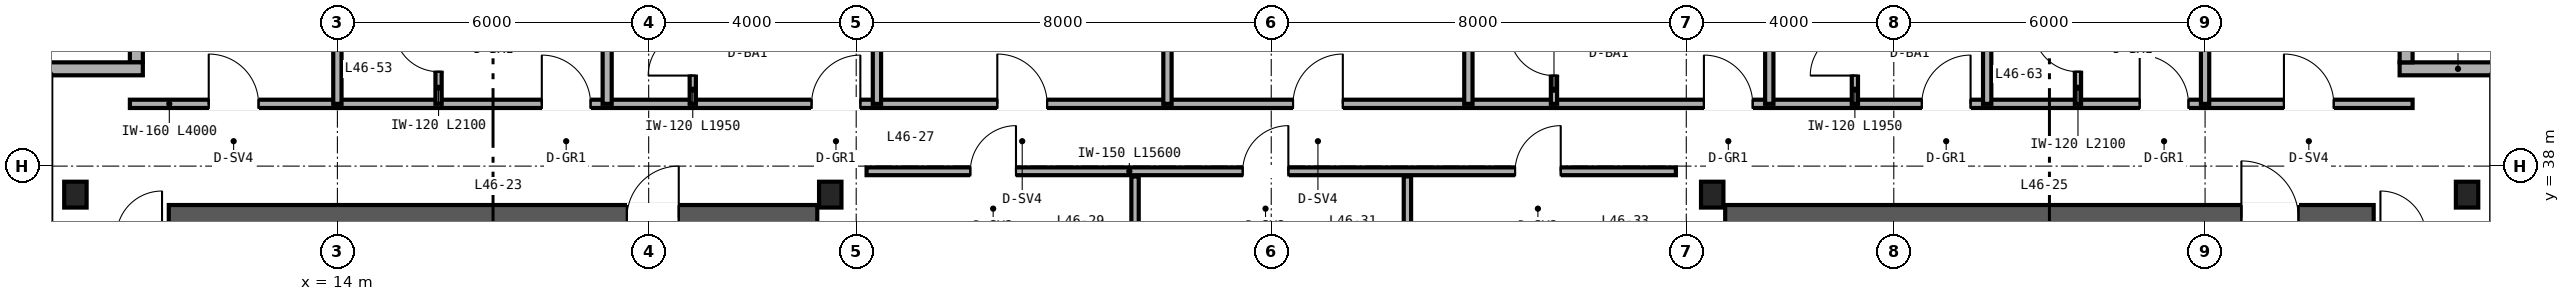
"""IFC4 building model, lengths in metres.
Left out: names, types, materials, properties, quantities, classifications, styles, units other than length and angle.
Written with IfcOpenShell. Run it as: python <this file> out.ifc"""

import sys

from ifc_helpers import new_model, si_unit, direction, frame, frame_2d, origin, origin_2d, place, context, subcontext, project, spatial, rectangle, i_section, extrude, source, transform, mapped, element, fill, save


model = new_model("IFC4")
c1 = context("Model", 3, precision=1e-05, world=origin(), true_north=direction((0.0, 1.0)))
c2 = subcontext(c1, "Body", "Model", "MODEL_VIEW")
j1 = project(units=[si_unit("LENGTHUNIT", "METRE"), si_unit("PLANEANGLEUNIT", "RADIAN")], contexts=[c1])
p1 = place(None, origin())
s1 = spatial("IfcSite", under=j1, at=p1, CompositionType="ELEMENT")
p2 = place(p1, origin())
s2 = spatial("IfcBuilding", under=s1, at=p2, CompositionType="ELEMENT")
p3 = place(p2, frame((0.0, 0.0, 184.8)))
s3 = spatial("IfcBuildingStorey", under=s2, at=p3, CompositionType="ELEMENT", Elevation=184.8)
p4 = place(p3, frame((10.75, 37.0, 0.0), z_axis=(0.0, 0.0, 1.0), x_axis=(1.0, 0.0, 0.0)))
e1 = element("IfcWall", 1, at=p4, inside=s3, PredefinedType="SHEAR", context=c2, shape_type="SweptSolid", body=[
    extrude(rectangle(XDim=12.5, YDim=0.5, at=frame_2d((6.25, 0.0))), origin(), (0.0, 0.0, 1.0), 3.37),
])
p5 = place(p4, frame((8.83, 0.0, 0.0)))
e2 = element("IfcOpeningElement", 2, at=p5, cuts=e1, PredefinedType="OPENING", context=c2, shape_type="SweptSolid", body=[
    extrude(rectangle(XDim=1.0, YDim=2.15, at=frame_2d((0.5, 1.075))), frame((0.0, 0.26, 0.0), z_axis=(0.0, -1.0, 0.0), x_axis=(1.0, 0.0, 0.0)), (0.0, 0.0, 1.0), 0.52),
])
p6 = place(p3, frame((40.75, 37.0, 0.0), z_axis=(0.0, 0.0, 1.0), x_axis=(1.0, 0.0, 0.0)))
e3 = element("IfcWall", 3, at=p6, inside=s3, PredefinedType="SHEAR", context=c2, shape_type="SweptSolid", body=[
    extrude(rectangle(XDim=12.5, YDim=0.5, at=frame_2d((6.25, 0.0))), origin(), (0.0, 0.0, 1.0), 3.37),
])
p7 = place(p6, frame((9.95, 0.0, 0.0)))
e4 = element("IfcOpeningElement", 4, at=p7, cuts=e3, PredefinedType="OPENING", context=c2, shape_type="SweptSolid", body=[
    extrude(rectangle(XDim=1.1, YDim=2.15, at=frame_2d((0.55, 1.075))), frame((0.0, 0.26, 0.0), z_axis=(0.0, -1.0, 0.0), x_axis=(1.0, 0.0, 0.0)), (0.0, 0.0, 1.0), 0.52),
])
m1 = source(origin(), c2, "Body", "SweptSolid", [
    extrude(i_section(OverallWidth=0.432, OverallDepth=0.498, WebThickness=0.056, FlangeThickness=0.089, FilletRadius=0.025, at=origin_2d()), origin(), (0.0, 0.0, 1.0), 3.37),
])
for number, where, z_axis, x_axis in (
    (5, (8.95, 37.45, 0.0), (0.0, 0.0, 1.0), (1.0, 0.0, 0.0)),
    (6, (23.5, 37.45, 0.0), (0.0, 0.0, 1.0), (1.0, 0.0, 0.0)),
    (7, (40.5, 37.45, 0.0), (0.0, 0.0, 1.0), (1.0, 0.0, 0.0)),
    (8, (55.05, 37.45, 0.0), (0.0, 0.0, 1.0), (1.0, 0.0, 0.0)),
):
    element("IfcColumn", number, at=place(p3, frame(where, z_axis=z_axis, x_axis=x_axis)), inside=s3, PredefinedType="COLUMN", context=c2, shape_type="MappedRepresentation", body=[
        mapped(m1, transform((0.0, 0.0, 0.0), scale=1.0)),
    ])
p8 = place(p3, frame((56.0, 39.875, 0.0), z_axis=(0.0, 0.0, 1.0), x_axis=(-1.0, 0.0, 0.0)))
e9 = element("IfcWall", 9, at=p8, inside=s3, PredefinedType="SOLIDWALL", context=c2, shape_type="SweptSolid", body=[
    extrude(rectangle(XDim=2.25, YDim=0.25, at=frame_2d((1.125, 0.0))), origin(), (0.0, 0.0, 1.0), 3.37),
])
for number, where, z_axis, x_axis in (
    (10, (53.875, 40.0, 0.0), (0.0, 0.0, 1.0), (0.0, 1.0, 0.0)),
    (11, (10.125, 42.0, 0.0), (0.0, 0.0, 1.0), (0.0, -1.0, 0.0)),
):
    element("IfcWall", number, at=place(p3, frame(where, z_axis=z_axis, x_axis=x_axis)), inside=s3, PredefinedType="SOLIDWALL", context=c2, shape_type="SweptSolid", body=[
        extrude(rectangle(XDim=2.0, YDim=0.25, at=frame_2d((1.0, 0.0))), origin(), (0.0, 0.0, 1.0), 3.37),
    ])
p9 = place(p3, frame((10.25, 39.875, 0.0), z_axis=(0.0, 0.0, 1.0), x_axis=(-1.0, 0.0, 0.0)))
e12 = element("IfcWall", 12, at=p9, inside=s3, PredefinedType="SOLIDWALL", context=c2, shape_type="SweptSolid", body=[
    extrude(rectangle(XDim=2.25, YDim=0.25, at=frame_2d((1.125, 0.0))), origin(), (0.0, 0.0, 1.0), 3.37),
])
p10 = place(p3, frame((24.2, 37.9, 0.0), z_axis=(0.0, 0.0, 1.0), x_axis=(1.0, 0.0, 0.0)))
e13 = element("IfcWall", 13, at=p10, inside=s3, PredefinedType="PARTITIONING", context=c2, shape_type="SweptSolid", body=[
    extrude(rectangle(XDim=15.6, YDim=0.15, at=frame_2d((7.8, 0.0))), origin(), (0.0, 0.0, 1.0), 3.37),
])
p11 = place(p10, frame((2.0, 0.0, 0.0)))
e14 = element("IfcOpeningElement", 14, at=p11, cuts=e13, PredefinedType="OPENING", context=c2, shape_type="SweptSolid", body=[
    extrude(rectangle(XDim=0.88, YDim=2.15, at=frame_2d((0.44, 1.075))), frame((0.0, 0.085, 0.0), z_axis=(0.0, -1.0, 0.0), x_axis=(1.0, 0.0, 0.0)), (0.0, 0.0, 1.0), 0.17),
])
p12 = place(p10, frame((7.25, 0.0, 0.0)))
e15 = element("IfcOpeningElement", 15, at=p12, cuts=e13, PredefinedType="OPENING", context=c2, shape_type="SweptSolid", body=[
    extrude(rectangle(XDim=0.88, YDim=2.15, at=frame_2d((0.44, 1.075))), frame((0.0, 0.085, 0.0), z_axis=(0.0, -1.0, 0.0), x_axis=(1.0, 0.0, 0.0)), (0.0, 0.0, 1.0), 0.17),
])
p13 = place(p10, frame((12.5, 0.0, 0.0)))
e16 = element("IfcOpeningElement", 16, at=p13, cuts=e13, PredefinedType="OPENING", context=c2, shape_type="SweptSolid", body=[
    extrude(rectangle(XDim=0.88, YDim=2.15, at=frame_2d((0.44, 1.075))), frame((0.0, 0.085, 0.0), z_axis=(0.0, -1.0, 0.0), x_axis=(1.0, 0.0, 0.0)), (0.0, 0.0, 1.0), 0.17),
])
for number, where, z_axis, x_axis in (
    (17, (29.375, 36.12, 0.0), (0.0, 0.0, 1.0), (0.0, 1.0, 0.0)),
    (18, (34.625, 36.12, 0.0), (0.0, 0.0, 1.0), (0.0, 1.0, 0.0)),
):
    element("IfcWall", number, at=place(p3, frame(where, z_axis=z_axis, x_axis=x_axis)), inside=s3, PredefinedType="PARTITIONING", context=c2, shape_type="SweptSolid", body=[
        extrude(rectangle(XDim=1.68, YDim=0.142, at=frame_2d((0.84, 0.0))), origin(), (0.0, 0.0, 1.0), 3.37),
    ])
p14 = place(p3, frame((10.0, 39.2, 0.0), z_axis=(0.0, 0.0, 1.0), x_axis=(1.0, 0.0, 0.0)))
e19 = element("IfcWall", 19, at=p14, inside=s3, PredefinedType="PARTITIONING", context=c2, shape_type="SweptSolid", body=[
    extrude(rectangle(XDim=4.0, YDim=0.16, at=frame_2d((2.0, 0.0))), origin(), (0.0, 0.0, 1.0), 3.37),
])
p15 = place(p14, frame((1.52, 0.0, 0.0)))
e20 = element("IfcOpeningElement", 20, at=p15, cuts=e19, PredefinedType="OPENING", context=c2, shape_type="SweptSolid", body=[
    extrude(rectangle(XDim=0.96, YDim=2.15, at=frame_2d((0.48, 1.075))), frame((0.0, 0.09, 0.0), z_axis=(0.0, -1.0, 0.0), x_axis=(1.0, 0.0, 0.0)), (0.0, 0.0, 1.0), 0.18),
])
p16 = place(p3, frame((50.0, 39.2, 0.0), z_axis=(0.0, 0.0, 1.0), x_axis=(1.0, 0.0, 0.0)))
e21 = element("IfcWall", 21, at=p16, inside=s3, PredefinedType="PARTITIONING", context=c2, shape_type="SweptSolid", body=[
    extrude(rectangle(XDim=4.0, YDim=0.16, at=frame_2d((2.0, 0.0))), origin(), (0.0, 0.0, 1.0), 3.37),
])
p17 = place(p16, frame((1.52, 0.0, 0.0)))
e22 = element("IfcOpeningElement", 22, at=p17, cuts=e21, PredefinedType="OPENING", context=c2, shape_type="SweptSolid", body=[
    extrude(rectangle(XDim=0.96, YDim=2.15, at=frame_2d((0.48, 1.075))), frame((0.0, 0.09, 0.0), z_axis=(0.0, -1.0, 0.0), x_axis=(1.0, 0.0, 0.0)), (0.0, 0.0, 1.0), 0.18),
])
p18 = place(p3, frame((14.0, 39.2, 0.0), z_axis=(0.0, 0.0, 1.0), x_axis=(1.0, 0.0, 0.0)))
e23 = element("IfcWall", 23, at=p18, inside=s3, PredefinedType="PARTITIONING", context=c2, shape_type="SweptSolid", body=[
    extrude(rectangle(XDim=36.0, YDim=0.16, at=frame_2d((18.0, 0.0))), origin(), (0.0, 0.0, 1.0), 2.913),
])
p19 = place(p18, frame((3.94, 0.0, 0.0)))
e24 = element("IfcOpeningElement", 24, at=p19, cuts=e23, PredefinedType="OPENING", context=c2, shape_type="SweptSolid", body=[
    extrude(rectangle(XDim=0.94, YDim=2.15, at=frame_2d((0.47, 1.075))), frame((0.0, 0.09, 0.0), z_axis=(0.0, -1.0, 0.0), x_axis=(1.0, 0.0, 0.0)), (0.0, 0.0, 1.0), 0.18),
])
p20 = place(p18, frame((9.14, 0.0, 0.0)))
e25 = element("IfcOpeningElement", 25, at=p20, cuts=e23, PredefinedType="OPENING", context=c2, shape_type="SweptSolid", body=[
    extrude(rectangle(XDim=0.94, YDim=2.15, at=frame_2d((0.47, 1.075))), frame((0.0, 0.09, 0.0), z_axis=(0.0, -1.0, 0.0), x_axis=(1.0, 0.0, 0.0)), (0.0, 0.0, 1.0), 0.18),
])
p21 = place(p18, frame((12.72, 0.0, 0.0)))
e26 = element("IfcOpeningElement", 26, at=p21, cuts=e23, PredefinedType="OPENING", context=c2, shape_type="SweptSolid", body=[
    extrude(rectangle(XDim=0.96, YDim=2.15, at=frame_2d((0.48, 1.075))), frame((0.0, 0.09, 0.0), z_axis=(0.0, -1.0, 0.0), x_axis=(1.0, 0.0, 0.0)), (0.0, 0.0, 1.0), 0.18),
])
p22 = place(p18, frame((18.42, 0.0, 0.0)))
e27 = element("IfcOpeningElement", 27, at=p22, cuts=e23, PredefinedType="OPENING", context=c2, shape_type="SweptSolid", body=[
    extrude(rectangle(XDim=0.96, YDim=2.15, at=frame_2d((0.48, 1.075))), frame((0.0, 0.09, 0.0), z_axis=(0.0, -1.0, 0.0), x_axis=(1.0, 0.0, 0.0)), (0.0, 0.0, 1.0), 0.18),
])
p23 = place(p18, frame((26.34, 0.0, 0.0)))
e28 = element("IfcOpeningElement", 28, at=p23, cuts=e23, PredefinedType="OPENING", context=c2, shape_type="SweptSolid", body=[
    extrude(rectangle(XDim=0.94, YDim=2.15, at=frame_2d((0.47, 1.075))), frame((0.0, 0.09, 0.0), z_axis=(0.0, -1.0, 0.0), x_axis=(1.0, 0.0, 0.0)), (0.0, 0.0, 1.0), 0.18),
])
p24 = place(p18, frame((30.54, 0.0, 0.0)))
e29 = element("IfcOpeningElement", 29, at=p24, cuts=e23, PredefinedType="OPENING", context=c2, shape_type="SweptSolid", body=[
    extrude(rectangle(XDim=0.94, YDim=2.15, at=frame_2d((0.47, 1.075))), frame((0.0, 0.09, 0.0), z_axis=(0.0, -1.0, 0.0), x_axis=(1.0, 0.0, 0.0)), (0.0, 0.0, 1.0), 0.18),
])
p25 = place(p18, frame((34.74, 0.0, 0.0)))
e30 = element("IfcOpeningElement", 30, at=p25, cuts=e23, PredefinedType="OPENING", context=c2, shape_type="SweptSolid", body=[
    extrude(rectangle(XDim=0.94, YDim=2.15, at=frame_2d((0.47, 1.075))), frame((0.0, 0.09, 0.0), z_axis=(0.0, -1.0, 0.0), x_axis=(1.0, 0.0, 0.0)), (0.0, 0.0, 1.0), 0.18),
])
for number, where, z_axis, x_axis in (
    (31, (14.0, 39.2, 0.0), (0.0, 0.0, 1.0), (0.0, 1.0, 0.0)),
    (32, (50.0, 39.2, 0.0), (0.0, 0.0, 1.0), (0.0, 1.0, 0.0)),
):
    element("IfcWall", number, at=place(p3, frame(where, z_axis=z_axis, x_axis=x_axis)), inside=s3, PredefinedType="PARTITIONING", context=c2, shape_type="SweptSolid", body=[
        extrude(rectangle(XDim=6.44, YDim=0.16, at=frame_2d((3.22, 0.0))), origin(), (0.0, 0.0, 1.0), 2.677),
    ])
p26 = place(p3, frame((19.2, 39.2, 0.0), z_axis=(0.0, 0.0, 1.0), x_axis=(0.0, 1.0, 0.0)))
e33 = element("IfcWall", 33, at=p26, inside=s3, PredefinedType="PARTITIONING", context=c2, shape_type="SweptSolid", body=[
    extrude(rectangle(XDim=6.44, YDim=0.175, at=frame_2d((3.22, 0.0))), origin(), (0.0, 0.0, 1.0), 2.677),
])
p27 = place(p3, frame((15.95, 39.2, 0.0), z_axis=(0.0, 0.0, 1.0), x_axis=(0.0, 1.0, 0.0)))
e34 = element("IfcWall", 34, at=p27, inside=s3, PredefinedType="PARTITIONING", context=c2, shape_type="SweptSolid", body=[
    extrude(rectangle(XDim=2.1, YDim=0.12, at=frame_2d((1.05, 0.0))), origin(), (0.0, 0.0, 1.0), 3.37),
])
p28 = place(p27, frame((0.62, 0.0, 0.0)))
e35 = element("IfcOpeningElement", 35, at=p28, cuts=e34, PredefinedType="OPENING", context=c2, shape_type="SweptSolid", body=[
    extrude(rectangle(XDim=0.86, YDim=2.1, at=frame_2d((0.43, 1.05))), frame((0.0, 0.07, 0.0), z_axis=(0.0, -1.0, 0.0), x_axis=(1.0, 0.0, 0.0)), (0.0, 0.0, 1.0), 0.14),
])
p29 = place(p3, frame((24.4, 39.2, 0.0), z_axis=(0.0, 0.0, 1.0), x_axis=(0.0, 1.0, 0.0)))
e36 = element("IfcWall", 36, at=p29, inside=s3, PredefinedType="PARTITIONING", context=c2, shape_type="SweptSolid", body=[
    extrude(rectangle(XDim=6.44, YDim=0.16, at=frame_2d((3.22, 0.0))), origin(), (0.0, 0.0, 1.0), 2.443),
])
p30 = place(p3, frame((20.85, 39.2, 0.0), z_axis=(0.0, 0.0, 1.0), x_axis=(0.0, 1.0, 0.0)))
e37 = element("IfcWall", 37, at=p30, inside=s3, PredefinedType="PARTITIONING", context=c2, shape_type="SweptSolid", body=[
    extrude(rectangle(XDim=1.95, YDim=0.12, at=frame_2d((0.975, 0.0))), origin(), (0.0, 0.0, 1.0), 3.37),
])
p31 = place(p30, frame((0.545, 0.0, 0.0)))
e38 = element("IfcOpeningElement", 38, at=p31, cuts=e37, PredefinedType="OPENING", context=c2, shape_type="SweptSolid", body=[
    extrude(rectangle(XDim=0.86, YDim=2.1, at=frame_2d((0.43, 1.05))), frame((0.0, 0.07, 0.0), z_axis=(0.0, -1.0, 0.0), x_axis=(1.0, 0.0, 0.0)), (0.0, 0.0, 1.0), 0.14),
])
for number, where, z_axis, x_axis in (
    (39, (30.0, 39.2, 0.0), (0.0, 0.0, 1.0), (0.0, 1.0, 0.0)),
    (40, (35.8, 39.2, 0.0), (0.0, 0.0, 1.0), (0.0, 1.0, 0.0)),
):
    element("IfcWall", number, at=place(p3, frame(where, z_axis=z_axis, x_axis=x_axis)), inside=s3, PredefinedType="PARTITIONING", context=c2, shape_type="SweptSolid", body=[
        extrude(rectangle(XDim=6.44, YDim=0.16, at=frame_2d((3.22, 0.0))), origin(), (0.0, 0.0, 1.0), 2.443),
    ])
p32 = place(p3, frame((41.6, 39.2, 0.0), z_axis=(0.0, 0.0, 1.0), x_axis=(0.0, 1.0, 0.0)))
e41 = element("IfcWall", 41, at=p32, inside=s3, PredefinedType="PARTITIONING", context=c2, shape_type="SweptSolid", body=[
    extrude(rectangle(XDim=6.44, YDim=0.16, at=frame_2d((3.22, 0.0))), origin(), (0.0, 0.0, 1.0), 2.833),
])
p33 = place(p3, frame((37.45, 39.2, 0.0), z_axis=(0.0, 0.0, 1.0), x_axis=(0.0, 1.0, 0.0)))
e42 = element("IfcWall", 42, at=p33, inside=s3, PredefinedType="PARTITIONING", context=c2, shape_type="SweptSolid", body=[
    extrude(rectangle(XDim=1.95, YDim=0.12, at=frame_2d((0.975, 0.0))), origin(), (0.0, 0.0, 1.0), 3.37),
])
p34 = place(p33, frame((0.545, 0.0, 0.0)))
e43 = element("IfcOpeningElement", 43, at=p34, cuts=e42, PredefinedType="OPENING", context=c2, shape_type="SweptSolid", body=[
    extrude(rectangle(XDim=0.86, YDim=2.1, at=frame_2d((0.43, 1.05))), frame((0.0, 0.07, 0.0), z_axis=(0.0, -1.0, 0.0), x_axis=(1.0, 0.0, 0.0)), (0.0, 0.0, 1.0), 0.14),
])
p35 = place(p3, frame((45.8, 39.2, 0.0), z_axis=(0.0, 0.0, 1.0), x_axis=(0.0, 1.0, 0.0)))
e44 = element("IfcWall", 44, at=p35, inside=s3, PredefinedType="PARTITIONING", context=c2, shape_type="SweptSolid", body=[
    extrude(rectangle(XDim=6.44, YDim=0.16, at=frame_2d((3.22, 0.0))), origin(), (0.0, 0.0, 1.0), 2.677),
])
p36 = place(p3, frame((43.25, 39.2, 0.0), z_axis=(0.0, 0.0, 1.0), x_axis=(0.0, 1.0, 0.0)))
e45 = element("IfcWall", 45, at=p36, inside=s3, PredefinedType="PARTITIONING", context=c2, shape_type="SweptSolid", body=[
    extrude(rectangle(XDim=1.95, YDim=0.12, at=frame_2d((0.975, 0.0))), origin(), (0.0, 0.0, 1.0), 3.37),
])
p37 = place(p36, frame((0.545, 0.0, 0.0)))
e46 = element("IfcOpeningElement", 46, at=p37, cuts=e45, PredefinedType="OPENING", context=c2, shape_type="SweptSolid", body=[
    extrude(rectangle(XDim=0.86, YDim=2.1, at=frame_2d((0.43, 1.05))), frame((0.0, 0.07, 0.0), z_axis=(0.0, -1.0, 0.0), x_axis=(1.0, 0.0, 0.0)), (0.0, 0.0, 1.0), 0.14),
])
p38 = place(p3, frame((47.55, 39.2, 0.0), z_axis=(0.0, 0.0, 1.0), x_axis=(0.0, 1.0, 0.0)))
e47 = element("IfcWall", 47, at=p38, inside=s3, PredefinedType="PARTITIONING", context=c2, shape_type="SweptSolid", body=[
    extrude(rectangle(XDim=2.1, YDim=0.12, at=frame_2d((1.05, 0.0))), origin(), (0.0, 0.0, 1.0), 3.37),
])
p39 = place(p38, frame((0.62, 0.0, 0.0)))
e48 = element("IfcOpeningElement", 48, at=p39, cuts=e47, PredefinedType="OPENING", context=c2, shape_type="SweptSolid", body=[
    extrude(rectangle(XDim=0.86, YDim=2.1, at=frame_2d((0.43, 1.05))), frame((0.0, 0.07, 0.0), z_axis=(0.0, -1.0, 0.0), x_axis=(1.0, 0.0, 0.0)), (0.0, 0.0, 1.0), 0.14),
])
m2 = source(origin(), c2, "Body", "SweptSolid", [
    extrude(rectangle(XDim=1.0, YDim=2.15, at=frame_2d((0.5, 1.075))), frame((0.0, 0.025, 0.0), z_axis=(0.0, -1.0, 0.0), x_axis=(1.0, 0.0, 0.0)), (0.0, 0.0, 1.0), 0.05),
])
p40 = place(p5, origin())
e49 = element("IfcDoor", 49, at=p40, inside=s3, OperationType="SINGLE_SWING_RIGHT", PredefinedType="DOOR", context=c2, shape_type="MappedRepresentation", body=[
    mapped(m2, transform((0.0, 0.0, 0.0), scale=1.0)),
])
fill(e2, e49)
m3 = source(origin(), c2, "Body", "SweptSolid", [
    extrude(rectangle(XDim=1.1, YDim=2.15, at=frame_2d((0.55, 1.075))), frame((0.0, 0.025, 0.0), z_axis=(0.0, -1.0, 0.0), x_axis=(1.0, 0.0, 0.0)), (0.0, 0.0, 1.0), 0.05),
])
p41 = place(p7, origin())
e50 = element("IfcDoor", 50, at=p41, inside=s3, OperationType="SINGLE_SWING_LEFT", PredefinedType="DOOR", context=c2, shape_type="MappedRepresentation", body=[
    mapped(m3, transform((0.0, 0.0, 0.0), scale=1.0)),
])
fill(e4, e50)
m4 = source(origin(), c2, "Body", "SweptSolid", [
    extrude(rectangle(XDim=0.88, YDim=2.15, at=frame_2d((0.44, 1.075))), frame((0.0, 0.025, 0.0), z_axis=(0.0, -1.0, 0.0), x_axis=(1.0, 0.0, 0.0)), (0.0, 0.0, 1.0), 0.05),
])
p42 = place(p11, origin())
e51 = element("IfcDoor", 51, at=p42, inside=s3, OperationType="SINGLE_SWING_RIGHT", PredefinedType="DOOR", context=c2, shape_type="MappedRepresentation", body=[
    mapped(m4, transform((0.0, 0.0, 0.0), scale=1.0)),
])
fill(e14, e51)
p43 = place(p12, origin())
e52 = element("IfcDoor", 52, at=p43, inside=s3, OperationType="SINGLE_SWING_RIGHT", PredefinedType="DOOR", context=c2, shape_type="MappedRepresentation", body=[
    mapped(m4, transform((0.0, 0.0, 0.0), scale=1.0)),
])
fill(e15, e52)
p44 = place(p13, origin())
e53 = element("IfcDoor", 53, at=p44, inside=s3, OperationType="SINGLE_SWING_RIGHT", PredefinedType="DOOR", context=c2, shape_type="MappedRepresentation", body=[
    mapped(m4, transform((0.0, 0.0, 0.0), scale=1.0)),
])
fill(e16, e53)
m5 = source(origin(), c2, "Body", "SweptSolid", [
    extrude(rectangle(XDim=0.96, YDim=2.15, at=frame_2d((0.48, 1.075))), frame((0.0, 0.025, 0.0), z_axis=(0.0, -1.0, 0.0), x_axis=(1.0, 0.0, 0.0)), (0.0, 0.0, 1.0), 0.05),
])
p45 = place(p15, origin())
e54 = element("IfcDoor", 54, at=p45, inside=s3, OperationType="SINGLE_SWING_LEFT", PredefinedType="DOOR", context=c2, shape_type="MappedRepresentation", body=[
    mapped(m5, transform((0.0, 0.0, 0.0), scale=1.0)),
])
fill(e20, e54)
p46 = place(p17, origin())
e55 = element("IfcDoor", 55, at=p46, inside=s3, OperationType="SINGLE_SWING_LEFT", PredefinedType="DOOR", context=c2, shape_type="MappedRepresentation", body=[
    mapped(m5, transform((0.0, 0.0, 0.0), scale=1.0)),
])
fill(e22, e55)
m6 = source(origin(), c2, "Body", "SweptSolid", [
    extrude(rectangle(XDim=0.86, YDim=2.1, at=frame_2d((0.43, 1.05))), frame((0.0, 0.025, 0.0), z_axis=(0.0, -1.0, 0.0), x_axis=(1.0, 0.0, 0.0)), (0.0, 0.0, 1.0), 0.05),
])
p47 = place(p28, origin())
e56 = element("IfcDoor", 56, at=p47, inside=s3, OperationType="SINGLE_SWING_RIGHT", PredefinedType="DOOR", context=c2, shape_type="MappedRepresentation", body=[
    mapped(m6, transform((0.0, 0.0, 0.0), scale=1.0)),
])
fill(e35, e56)
p48 = place(p31, origin())
e57 = element("IfcDoor", 57, at=p48, inside=s3, OperationType="SINGLE_SWING_LEFT", PredefinedType="DOOR", context=c2, shape_type="MappedRepresentation", body=[
    mapped(m6, transform((0.0, 0.0, 0.0), scale=1.0)),
])
fill(e38, e57)
p49 = place(p34, origin())
e58 = element("IfcDoor", 58, at=p49, inside=s3, OperationType="SINGLE_SWING_RIGHT", PredefinedType="DOOR", context=c2, shape_type="MappedRepresentation", body=[
    mapped(m6, transform((0.0, 0.0, 0.0), scale=1.0)),
])
fill(e43, e58)
p50 = place(p37, origin())
e59 = element("IfcDoor", 59, at=p50, inside=s3, OperationType="SINGLE_SWING_LEFT", PredefinedType="DOOR", context=c2, shape_type="MappedRepresentation", body=[
    mapped(m6, transform((0.0, 0.0, 0.0), scale=1.0)),
])
fill(e46, e59)
p51 = place(p39, origin())
e60 = element("IfcDoor", 60, at=p51, inside=s3, OperationType="SINGLE_SWING_RIGHT", PredefinedType="DOOR", context=c2, shape_type="MappedRepresentation", body=[
    mapped(m6, transform((0.0, 0.0, 0.0), scale=1.0)),
])
fill(e48, e60)
m7 = source(origin(), c2, "Body", "SweptSolid", [
    extrude(rectangle(XDim=0.94, YDim=2.15, at=frame_2d((0.47, 1.075))), frame((0.0, 0.025, 0.0), z_axis=(0.0, -1.0, 0.0), x_axis=(1.0, 0.0, 0.0)), (0.0, 0.0, 1.0), 0.05),
])
p52 = place(p19, origin())
e61 = element("IfcDoor", 61, at=p52, inside=s3, OperationType="SINGLE_SWING_LEFT", PredefinedType="DOOR", context=c2, shape_type="MappedRepresentation", body=[
    mapped(m7, transform((0.0, 0.0, 0.0), scale=1.0)),
])
fill(e24, e61)
p53 = place(p20, origin())
e62 = element("IfcDoor", 62, at=p53, inside=s3, OperationType="SINGLE_SWING_RIGHT", PredefinedType="DOOR", context=c2, shape_type="MappedRepresentation", body=[
    mapped(m7, transform((0.0, 0.0, 0.0), scale=1.0)),
])
fill(e25, e62)
p54 = place(p21, origin())
e63 = element("IfcDoor", 63, at=p54, inside=s3, OperationType="SINGLE_SWING_LEFT", PredefinedType="DOOR", context=c2, shape_type="MappedRepresentation", body=[
    mapped(m5, transform((0.0, 0.0, 0.0), scale=1.0)),
])
fill(e26, e63)
p55 = place(p22, origin())
e64 = element("IfcDoor", 64, at=p55, inside=s3, OperationType="SINGLE_SWING_RIGHT", PredefinedType="DOOR", context=c2, shape_type="MappedRepresentation", body=[
    mapped(m5, transform((0.0, 0.0, 0.0), scale=1.0)),
])
fill(e27, e64)
p56 = place(p23, origin())
e65 = element("IfcDoor", 65, at=p56, inside=s3, OperationType="SINGLE_SWING_LEFT", PredefinedType="DOOR", context=c2, shape_type="MappedRepresentation", body=[
    mapped(m7, transform((0.0, 0.0, 0.0), scale=1.0)),
])
fill(e28, e65)
p57 = place(p24, origin())
e66 = element("IfcDoor", 66, at=p57, inside=s3, OperationType="SINGLE_SWING_RIGHT", PredefinedType="DOOR", context=c2, shape_type="MappedRepresentation", body=[
    mapped(m7, transform((0.0, 0.0, 0.0), scale=1.0)),
])
fill(e29, e66)
p58 = place(p25, origin())
e67 = element("IfcDoor", 67, at=p58, inside=s3, OperationType="SINGLE_SWING_LEFT", PredefinedType="DOOR", context=c2, shape_type="MappedRepresentation", body=[
    mapped(m7, transform((0.0, 0.0, 0.0), scale=1.0)),
])
fill(e30, e67)
save(model, sys.argv[1])
